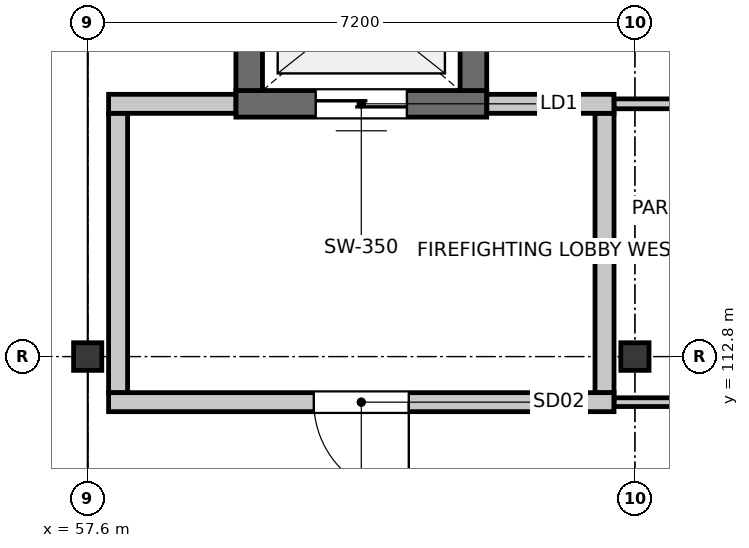
"""IFC4 building model, lengths in metres.
Left out: names, types, materials, properties, quantities, classifications, styles, units other than length and angle.
Written with IfcOpenShell. Run it as: python <this file> out.ifc"""

import sys

from ifc_helpers import new_model, si_unit, direction, frame, frame_2d, origin, origin_2d, place, context, subcontext, project, spatial, rectangle, i_section, extrude, element, fill, save


model = new_model("IFC4")
c1 = context("Model", 3, precision=1e-05, world=origin(), true_north=direction((0.0, 1.0)))
c2 = subcontext(c1, "Body", "Model", "MODEL_VIEW")
j1 = project(units=[si_unit("LENGTHUNIT", "METRE"), si_unit("PLANEANGLEUNIT", "RADIAN")], contexts=[c1])
p1 = place(None, origin())
s1 = spatial("IfcSite", under=j1, at=p1, CompositionType="ELEMENT")
p2 = place(p1, origin())
s2 = spatial("IfcBuilding", under=s1, at=p2, CompositionType="ELEMENT")
p3 = place(p2, frame((0.0, 0.0, 17.1)))
s3 = spatial("IfcBuildingStorey", under=s2, at=p3, CompositionType="ELEMENT", Elevation=17.1)
for number, where, z_axis, x_axis in (
    (1, (57.6, 112.8, 0.0), (0.0, 0.0, 1.0), (1.0, 0.0, 0.0)),
    (2, (64.8, 112.8, 0.0), (0.0, 0.0, 1.0), (1.0, 0.0, 0.0)),
):
    element("IfcColumn", number, at=place(p3, frame(where, z_axis=z_axis, x_axis=x_axis)), inside=s3, PredefinedType="COLUMN", context=c2, shape_type="SweptSolid", body=[
        extrude(i_section(OverallWidth=0.371, OverallDepth=0.363, WebThickness=0.013, FlangeThickness=0.022, FilletRadius=0.015, at=origin_2d()), origin(), (0.0, 0.0, 1.0), 3.9),
    ])
p4 = place(p3, frame((62.85, 116.125, 0.0), z_axis=(0.0, 0.0, 1.0), x_axis=(-1.0, 0.0, 0.0)))
e3 = element("IfcWall", 3, at=p4, inside=s3, PredefinedType="SHEAR", context=c2, shape_type="SweptSolid", body=[
    extrude(rectangle(XDim=3.3, YDim=0.35, at=frame_2d((1.65, 0.0))), origin(), (0.0, 0.0, 1.0), 3.64),
])
p5 = place(p4, frame((1.05, 0.0, 0.0)))
e4 = element("IfcOpeningElement", 4, at=p5, cuts=e3, PredefinedType="OPENING", context=c2, shape_type="SweptSolid", body=[
    extrude(rectangle(XDim=1.2, YDim=2.2, at=frame_2d((0.6, 1.1))), frame((0.0, 0.185, 0.0), z_axis=(0.0, -1.0, 0.0), x_axis=(1.0, 0.0, 0.0)), (0.0, 0.0, 1.0), 0.37),
])
for number, where, z_axis, x_axis in (
    (5, (59.725, 116.3, 0.0), (0.0, 0.0, 1.0), (0.0, 1.0, 0.0)),
    (6, (62.675, 118.5, 0.0), (0.0, 0.0, 1.0), (0.0, -1.0, 0.0)),
):
    element("IfcWall", number, at=place(p3, frame(where, z_axis=z_axis, x_axis=x_axis)), inside=s3, PredefinedType="SHEAR", context=c2, shape_type="SweptSolid", body=[
        extrude(rectangle(XDim=2.2, YDim=0.35, at=frame_2d((1.1, 0.0))), origin(), (0.0, 0.0, 1.0), 3.64),
    ])
p6 = place(p3, frame((64.525, 112.2, 0.0), z_axis=(0.0, 0.0, 1.0), x_axis=(-1.0, 0.0, 0.0)))
e7 = element("IfcWall", 7, at=p6, inside=s3, PredefinedType="PARTITIONING", context=c2, shape_type="SweptSolid", body=[
    extrude(rectangle(XDim=6.65, YDim=0.25, at=frame_2d((3.325, 0.0))), origin(), (0.0, 0.0, 1.0), 2.863),
])
p7 = place(p6, frame((2.7, 0.0, 0.0)))
e8 = element("IfcOpeningElement", 8, at=p7, cuts=e7, PredefinedType="OPENING", context=c2, shape_type="SweptSolid", body=[
    extrude(rectangle(XDim=1.25, YDim=2.2, at=frame_2d((0.625, 1.1))), frame((0.0, 0.135, 0.0), z_axis=(0.0, -1.0, 0.0), x_axis=(1.0, 0.0, 0.0)), (0.0, 0.0, 1.0), 0.27),
])
p8 = place(p3, frame((57.875, 116.125, 0.0), z_axis=(0.0, 0.0, 1.0), x_axis=(1.0, 0.0, 0.0)))
e9 = element("IfcWall", 9, at=p8, inside=s3, PredefinedType="PARTITIONING", context=c2, shape_type="SweptSolid", body=[
    extrude(rectangle(XDim=1.673, YDim=0.25, at=frame_2d((0.836, 0.0))), origin(), (0.0, 0.0, 1.0), 2.863),
])
p9 = place(p3, frame((62.852, 116.125, 0.0), z_axis=(0.0, 0.0, 1.0), x_axis=(1.0, 0.0, 0.0)))
e10 = element("IfcWall", 10, at=p9, inside=s3, PredefinedType="PARTITIONING", context=c2, shape_type="SweptSolid", body=[
    extrude(rectangle(XDim=1.673, YDim=0.25, at=frame_2d((0.836, 0.0))), origin(), (0.0, 0.0, 1.0), 2.863),
])
for number, where, z_axis, x_axis in (
    (11, (58.0, 112.327, 0.0), (0.0, 0.0, 1.0), (0.0, 1.0, 0.0)),
    (12, (64.4, 115.998, 0.0), (0.0, 0.0, 1.0), (0.0, -1.0, 0.0)),
):
    element("IfcWall", number, at=place(p3, frame(where, z_axis=z_axis, x_axis=x_axis)), inside=s3, PredefinedType="PARTITIONING", context=c2, shape_type="SweptSolid", body=[
        extrude(rectangle(XDim=3.671, YDim=0.25, at=frame_2d((1.835, 0.0))), origin(), (0.0, 0.0, 1.0), 2.863),
    ])
p10 = place(p3, frame((79.28, 112.2, 0.0), z_axis=(0.0, 0.0, 1.0), x_axis=(-1.0, 0.0, 0.0)))
e13 = element("IfcWall", 13, at=p10, inside=s3, PredefinedType="PARTITIONING", context=c2, shape_type="SweptSolid", body=[
    extrude(rectangle(XDim=14.753, YDim=0.115, at=frame_2d((7.376, 0.0))), origin(), (0.0, 0.0, 1.0), 2.863),
])
p11 = place(p10, frame((8.007, 0.0, 0.0)))
e14 = element("IfcOpeningElement", 14, at=p11, cuts=e13, PredefinedType="OPENING", context=c2, shape_type="SweptSolid", body=[
    extrude(rectangle(XDim=1.54, YDim=2.1, at=frame_2d((0.77, 1.05))), frame((0.0, 0.067, 0.0), z_axis=(0.0, -1.0, 0.0), x_axis=(1.0, 0.0, 0.0)), (0.0, 0.0, 1.0), 0.135),
])
p12 = place(p3, frame((64.527, 116.125, 0.0), z_axis=(0.0, 0.0, 1.0), x_axis=(1.0, 0.0, 0.0)))
e15 = element("IfcWall", 15, at=p12, inside=s3, PredefinedType="PARTITIONING", context=c2, shape_type="SweptSolid", body=[
    extrude(rectangle(XDim=14.753, YDim=0.13, at=frame_2d((7.376, 0.0))), origin(), (0.0, 0.0, 1.0), 2.863),
])
p13 = place(p5, origin())
e16 = element("IfcDoor", 16, at=p13, inside=s3, OperationType="DOUBLE_DOOR_SLIDING", PredefinedType="DOOR", context=c2, shape_type="SweptSolid", body=[
    extrude(rectangle(XDim=1.2, YDim=2.2, at=frame_2d((0.6, 1.1))), frame((0.0, 0.025, 0.0), z_axis=(0.0, -1.0, 0.0), x_axis=(1.0, 0.0, 0.0)), (0.0, 0.0, 1.0), 0.05),
])
fill(e4, e16)
p14 = place(p7, origin())
e17 = element("IfcDoor", 17, at=p14, inside=s3, OperationType="SINGLE_SWING_LEFT", PredefinedType="DOOR", context=c2, shape_type="SweptSolid", body=[
    extrude(rectangle(XDim=1.25, YDim=2.2, at=frame_2d((0.625, 1.1))), frame((0.0, 0.025, 0.0), z_axis=(0.0, -1.0, 0.0), x_axis=(1.0, 0.0, 0.0)), (0.0, 0.0, 1.0), 0.05),
])
fill(e8, e17)
save(model, sys.argv[1])
